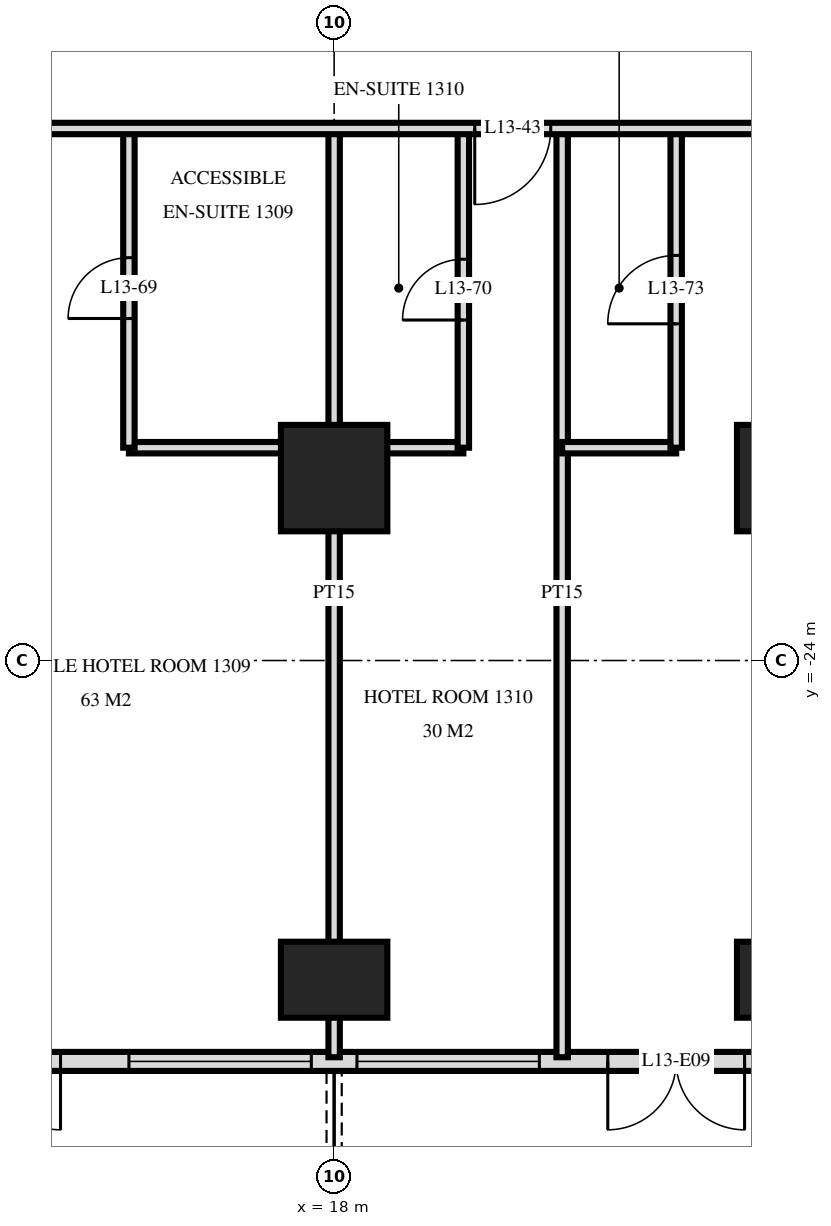
"""IFC4 building model, lengths in metres.
Left out: names, types, materials, properties, quantities, classifications, styles, units other than length and angle.
Written with IfcOpenShell. Run it as: python <this file> out.ifc"""

import sys

from ifc_helpers import new_model, si_unit, direction, frame, frame_2d, origin, origin_2d, place, context, subcontext, project, spatial, rectangle, extrude, element, fill, save


model = new_model("IFC4")
c1 = context("Model", 3, precision=1e-05, world=origin(), true_north=direction((0.0, 1.0)))
c2 = subcontext(c1, "Body", "Model", "MODEL_VIEW")
j1 = project(units=[si_unit("LENGTHUNIT", "METRE"), si_unit("PLANEANGLEUNIT", "RADIAN")], contexts=[c1])
p1 = place(None, origin())
s1 = spatial("IfcSite", under=j1, at=p1, CompositionType="ELEMENT")
p2 = place(p1, origin())
s2 = spatial("IfcBuilding", under=s1, at=p2, CompositionType="ELEMENT")
p3 = place(p2, frame((0.0, 0.0, 56.4)))
s3 = spatial("IfcBuildingStorey", under=s2, at=p3, CompositionType="ELEMENT", Elevation=56.4)
p4 = place(p3, frame((18.0, -28.2, 0.0), z_axis=(0.0, 0.0, 1.0), x_axis=(1.0, 0.0, 0.0)))
e1 = element("IfcColumn", 1, at=p4, inside=s3, PredefinedType="COLUMN", context=c2, shape_type="SweptSolid", body=[
    extrude(rectangle(XDim=1.4, YDim=1.0, at=origin_2d()), origin(), (0.0, 0.0, 1.0), 3.6),
])
p5 = place(p3, frame((18.0, -21.6, 0.0), z_axis=(0.0, 0.0, 1.0), x_axis=(1.0, 0.0, 0.0)))
e2 = element("IfcColumn", 2, at=p5, inside=s3, PredefinedType="COLUMN", context=c2, shape_type="SweptSolid", body=[
    extrude(rectangle(XDim=1.4, YDim=1.4, at=origin_2d()), origin(), (0.0, 0.0, 1.0), 3.6),
])
p6 = place(p3, frame((24.0, -28.2, 0.0), z_axis=(0.0, 0.0, 1.0), x_axis=(1.0, 0.0, 0.0)))
e3 = element("IfcColumn", 3, at=p6, inside=s3, PredefinedType="COLUMN", context=c2, shape_type="SweptSolid", body=[
    extrude(rectangle(XDim=1.4, YDim=1.0, at=origin_2d()), origin(), (0.0, 0.0, 1.0), 3.6),
])
p7 = place(p3, frame((24.0, -21.6, 0.0), z_axis=(0.0, 0.0, 1.0), x_axis=(1.0, 0.0, 0.0)))
e4 = element("IfcColumn", 4, at=p7, inside=s3, PredefinedType="COLUMN", context=c2, shape_type="SweptSolid", body=[
    extrude(rectangle(XDim=1.4, YDim=1.4, at=origin_2d()), origin(), (0.0, 0.0, 1.0), 3.6),
])
p8 = place(p3, frame((-28.775, -29.275, 0.0), z_axis=(0.0, 0.0, 1.0), x_axis=(1.0, 0.0, 0.0)))
e5 = element("IfcWall", 5, at=p8, inside=s3, PredefinedType="SOLIDWALL", context=c2, shape_type="SweptSolid", body=[
    extrude(rectangle(XDim=57.551, YDim=0.25, at=frame_2d((28.775, 0.0))), origin(), (0.0, 0.0, 1.0), 3.32),
])
p9 = place(p8, frame((0.575, 0.0, 0.0)))
e6 = element("IfcOpeningElement", 6, at=p9, cuts=e5, PredefinedType="OPENING", context=c2, shape_type="SweptSolid", body=[
    extrude(rectangle(XDim=1.8, YDim=2.4, at=frame_2d((0.9, 1.2))), frame((0.0, 0.135, 0.0), z_axis=(0.0, -1.0, 0.0), x_axis=(1.0, 0.0, 0.0)), (0.0, 0.0, 1.0), 0.27),
])
p10 = place(p8, frame((5.375, 0.0, 0.0)))
e7 = element("IfcOpeningElement", 7, at=p10, cuts=e5, PredefinedType="OPENING", context=c2, shape_type="SweptSolid", body=[
    extrude(rectangle(XDim=1.8, YDim=2.4, at=frame_2d((0.9, 1.2))), frame((0.0, 0.135, 0.0), z_axis=(0.0, -1.0, 0.0), x_axis=(1.0, 0.0, 0.0)), (0.0, 0.0, 1.0), 0.27),
])
p11 = place(p8, frame((8.075, 0.0, 0.3)))
e8 = element("IfcOpeningElement", 8, at=p11, cuts=e5, PredefinedType="OPENING", context=c2, shape_type="SweptSolid", body=[
    extrude(rectangle(XDim=2.4, YDim=2.1, at=frame_2d((1.2, 1.05))), frame((0.0, 0.135, 0.0), z_axis=(0.0, -1.0, 0.0), x_axis=(1.0, 0.0, 0.0)), (0.0, 0.0, 1.0), 0.27),
])
p12 = place(p8, frame((11.375, 0.0, 0.0)))
e9 = element("IfcOpeningElement", 9, at=p12, cuts=e5, PredefinedType="OPENING", context=c2, shape_type="SweptSolid", body=[
    extrude(rectangle(XDim=1.8, YDim=2.4, at=frame_2d((0.9, 1.2))), frame((0.0, 0.135, 0.0), z_axis=(0.0, -1.0, 0.0), x_axis=(1.0, 0.0, 0.0)), (0.0, 0.0, 1.0), 0.27),
])
p13 = place(p8, frame((14.075, 0.0, 0.3)))
e10 = element("IfcOpeningElement", 10, at=p13, cuts=e5, PredefinedType="OPENING", context=c2, shape_type="SweptSolid", body=[
    extrude(rectangle(XDim=2.4, YDim=2.1, at=frame_2d((1.2, 1.05))), frame((0.0, 0.135, 0.0), z_axis=(0.0, -1.0, 0.0), x_axis=(1.0, 0.0, 0.0)), (0.0, 0.0, 1.0), 0.27),
])
p14 = place(p8, frame((17.375, 0.0, 0.0)))
e11 = element("IfcOpeningElement", 11, at=p14, cuts=e5, PredefinedType="OPENING", context=c2, shape_type="SweptSolid", body=[
    extrude(rectangle(XDim=1.8, YDim=2.4, at=frame_2d((0.9, 1.2))), frame((0.0, 0.135, 0.0), z_axis=(0.0, -1.0, 0.0), x_axis=(1.0, 0.0, 0.0)), (0.0, 0.0, 1.0), 0.27),
])
p15 = place(p8, frame((20.075, 0.0, 0.3)))
e12 = element("IfcOpeningElement", 12, at=p15, cuts=e5, PredefinedType="OPENING", context=c2, shape_type="SweptSolid", body=[
    extrude(rectangle(XDim=2.4, YDim=2.1, at=frame_2d((1.2, 1.05))), frame((0.0, 0.135, 0.0), z_axis=(0.0, -1.0, 0.0), x_axis=(1.0, 0.0, 0.0)), (0.0, 0.0, 1.0), 0.27),
])
p16 = place(p8, frame((23.075, 0.0, 0.3)))
e13 = element("IfcOpeningElement", 13, at=p16, cuts=e5, PredefinedType="OPENING", context=c2, shape_type="SweptSolid", body=[
    extrude(rectangle(XDim=2.4, YDim=2.1, at=frame_2d((1.2, 1.05))), frame((0.0, 0.135, 0.0), z_axis=(0.0, -1.0, 0.0), x_axis=(1.0, 0.0, 0.0)), (0.0, 0.0, 1.0), 0.27),
])
p17 = place(p8, frame((26.375, 0.0, 0.0)))
e14 = element("IfcOpeningElement", 14, at=p17, cuts=e5, PredefinedType="OPENING", context=c2, shape_type="SweptSolid", body=[
    extrude(rectangle(XDim=1.8, YDim=2.4, at=frame_2d((0.9, 1.2))), frame((0.0, 0.135, 0.0), z_axis=(0.0, -1.0, 0.0), x_axis=(1.0, 0.0, 0.0)), (0.0, 0.0, 1.0), 0.27),
])
p18 = place(p8, frame((29.075, 0.0, 0.3)))
e15 = element("IfcOpeningElement", 15, at=p18, cuts=e5, PredefinedType="OPENING", context=c2, shape_type="SweptSolid", body=[
    extrude(rectangle(XDim=2.4, YDim=2.1, at=frame_2d((1.2, 1.05))), frame((0.0, 0.135, 0.0), z_axis=(0.0, -1.0, 0.0), x_axis=(1.0, 0.0, 0.0)), (0.0, 0.0, 1.0), 0.27),
])
p19 = place(p8, frame((32.375, 0.0, 0.0)))
e16 = element("IfcOpeningElement", 16, at=p19, cuts=e5, PredefinedType="OPENING", context=c2, shape_type="SweptSolid", body=[
    extrude(rectangle(XDim=1.8, YDim=2.4, at=frame_2d((0.9, 1.2))), frame((0.0, 0.135, 0.0), z_axis=(0.0, -1.0, 0.0), x_axis=(1.0, 0.0, 0.0)), (0.0, 0.0, 1.0), 0.27),
])
p20 = place(p8, frame((35.375, 0.0, 0.0)))
e17 = element("IfcOpeningElement", 17, at=p20, cuts=e5, PredefinedType="OPENING", context=c2, shape_type="SweptSolid", body=[
    extrude(rectangle(XDim=1.8, YDim=2.4, at=frame_2d((0.9, 1.2))), frame((0.0, 0.135, 0.0), z_axis=(0.0, -1.0, 0.0), x_axis=(1.0, 0.0, 0.0)), (0.0, 0.0, 1.0), 0.27),
])
p21 = place(p8, frame((38.075, 0.0, 0.3)))
e18 = element("IfcOpeningElement", 18, at=p21, cuts=e5, PredefinedType="OPENING", context=c2, shape_type="SweptSolid", body=[
    extrude(rectangle(XDim=2.4, YDim=2.1, at=frame_2d((1.2, 1.05))), frame((0.0, 0.135, 0.0), z_axis=(0.0, -1.0, 0.0), x_axis=(1.0, 0.0, 0.0)), (0.0, 0.0, 1.0), 0.27),
])
p22 = place(p8, frame((41.375, 0.0, 0.0)))
e19 = element("IfcOpeningElement", 19, at=p22, cuts=e5, PredefinedType="OPENING", context=c2, shape_type="SweptSolid", body=[
    extrude(rectangle(XDim=1.8, YDim=2.4, at=frame_2d((0.9, 1.2))), frame((0.0, 0.135, 0.0), z_axis=(0.0, -1.0, 0.0), x_axis=(1.0, 0.0, 0.0)), (0.0, 0.0, 1.0), 0.27),
])
p23 = place(p8, frame((44.075, 0.0, 0.3)))
e20 = element("IfcOpeningElement", 20, at=p23, cuts=e5, PredefinedType="OPENING", context=c2, shape_type="SweptSolid", body=[
    extrude(rectangle(XDim=2.4, YDim=2.1, at=frame_2d((1.2, 1.05))), frame((0.0, 0.135, 0.0), z_axis=(0.0, -1.0, 0.0), x_axis=(1.0, 0.0, 0.0)), (0.0, 0.0, 1.0), 0.27),
])
p24 = place(p8, frame((47.075, 0.0, 0.3)))
e21 = element("IfcOpeningElement", 21, at=p24, cuts=e5, PredefinedType="OPENING", context=c2, shape_type="SweptSolid", body=[
    extrude(rectangle(XDim=2.4, YDim=2.1, at=frame_2d((1.2, 1.05))), frame((0.0, 0.135, 0.0), z_axis=(0.0, -1.0, 0.0), x_axis=(1.0, 0.0, 0.0)), (0.0, 0.0, 1.0), 0.27),
])
p25 = place(p8, frame((50.375, 0.0, 0.0)))
e22 = element("IfcOpeningElement", 22, at=p25, cuts=e5, PredefinedType="OPENING", context=c2, shape_type="SweptSolid", body=[
    extrude(rectangle(XDim=1.8, YDim=2.4, at=frame_2d((0.9, 1.2))), frame((0.0, 0.135, 0.0), z_axis=(0.0, -1.0, 0.0), x_axis=(1.0, 0.0, 0.0)), (0.0, 0.0, 1.0), 0.27),
])
p26 = place(p8, frame((53.375, 0.0, 0.0)))
e23 = element("IfcOpeningElement", 23, at=p26, cuts=e5, PredefinedType="OPENING", context=c2, shape_type="SweptSolid", body=[
    extrude(rectangle(XDim=1.8, YDim=2.4, at=frame_2d((0.9, 1.2))), frame((0.0, 0.135, 0.0), z_axis=(0.0, -1.0, 0.0), x_axis=(1.0, 0.0, 0.0)), (0.0, 0.0, 1.0), 0.27),
])
p27 = place(p3, frame((22.5, -21.2, 0.0), z_axis=(0.0, 0.0, 1.0), x_axis=(0.0, 1.0, 0.0)))
e24 = element("IfcWall", 24, at=p27, inside=s3, PredefinedType="PARTITIONING", context=c2, shape_type="SweptSolid", body=[
    extrude(rectangle(XDim=4.2, YDim=0.15, at=frame_2d((2.1, 0.0))), origin(), (0.0, 0.0, 1.0), 3.32),
])
p28 = place(p27, frame((1.63, 0.0, 0.0)))
e25 = element("IfcOpeningElement", 25, at=p28, cuts=e24, PredefinedType="OPENING", context=c2, shape_type="SweptSolid", body=[
    extrude(rectangle(XDim=0.9, YDim=2.1, at=frame_2d((0.45, 1.05))), frame((0.0, 0.085, 0.0), z_axis=(0.0, -1.0, 0.0), x_axis=(1.0, 0.0, 0.0)), (0.0, 0.0, 1.0), 0.17),
])
p29 = place(p3, frame((21.0, -29.22, 0.0), z_axis=(0.0, 0.0, 1.0), x_axis=(0.0, 1.0, 0.0)))
e26 = element("IfcWall", 26, at=p29, inside=s3, PredefinedType="PARTITIONING", context=c2, shape_type="SweptSolid", body=[
    extrude(rectangle(XDim=12.22, YDim=0.15, at=frame_2d((6.11, 0.0))), origin(), (0.0, 0.0, 1.0), 3.32),
])
p30 = place(p3, frame((19.7, -21.2, 0.0), z_axis=(0.0, 0.0, 1.0), x_axis=(0.0, 1.0, 0.0)))
e27 = element("IfcWall", 27, at=p30, inside=s3, PredefinedType="PARTITIONING", context=c2, shape_type="SweptSolid", body=[
    extrude(rectangle(XDim=4.2, YDim=0.15, at=frame_2d((2.1, 0.0))), origin(), (0.0, 0.0, 1.0), 3.32),
])
p31 = place(p30, frame((1.68, 0.0, 0.0)))
e28 = element("IfcOpeningElement", 28, at=p31, cuts=e27, PredefinedType="OPENING", context=c2, shape_type="SweptSolid", body=[
    extrude(rectangle(XDim=0.8, YDim=2.1, at=frame_2d((0.4, 1.05))), frame((0.0, 0.085, 0.0), z_axis=(0.0, -1.0, 0.0), x_axis=(1.0, 0.0, 0.0)), (0.0, 0.0, 1.0), 0.17),
])
p32 = place(p3, frame((18.0, -29.22, 0.0), z_axis=(0.0, 0.0, 1.0), x_axis=(0.0, 1.0, 0.0)))
e29 = element("IfcWall", 29, at=p32, inside=s3, PredefinedType="PARTITIONING", context=c2, shape_type="SweptSolid", body=[
    extrude(rectangle(XDim=12.22, YDim=0.15, at=frame_2d((6.11, 0.0))), origin(), (0.0, 0.0, 1.0), 3.32),
])
p33 = place(p3, frame((15.3, -21.2, 0.0), z_axis=(0.0, 0.0, 1.0), x_axis=(0.0, 1.0, 0.0)))
e30 = element("IfcWall", 30, at=p33, inside=s3, PredefinedType="PARTITIONING", context=c2, shape_type="SweptSolid", body=[
    extrude(rectangle(XDim=4.2, YDim=0.15, at=frame_2d((2.1, 0.0))), origin(), (0.0, 0.0, 1.0), 3.32),
])
p34 = place(p33, frame((1.7, 0.0, 0.0)))
e31 = element("IfcOpeningElement", 31, at=p34, cuts=e30, PredefinedType="OPENING", context=c2, shape_type="SweptSolid", body=[
    extrude(rectangle(XDim=0.8, YDim=2.1, at=frame_2d((0.4, 1.05))), frame((0.0, 0.085, 0.0), z_axis=(0.0, -1.0, 0.0), x_axis=(1.0, 0.0, 0.0)), (0.0, 0.0, 1.0), 0.17),
])
p35 = place(p3, frame((15.3, -21.2, 0.0), z_axis=(0.0, 0.0, 1.0), x_axis=(1.0, 0.0, 0.0)))
e32 = element("IfcWall", 32, at=p35, inside=s3, PredefinedType="PARTITIONING", context=c2, shape_type="SweptSolid", body=[
    extrude(rectangle(XDim=4.4, YDim=0.15, at=frame_2d((2.2, 0.0))), origin(), (0.0, 0.0, 1.0), 3.32),
])
p36 = place(p3, frame((21.0, -21.2, 0.0), z_axis=(0.0, 0.0, 1.0), x_axis=(1.0, 0.0, 0.0)))
e33 = element("IfcWall", 33, at=p36, inside=s3, PredefinedType="PARTITIONING", context=c2, shape_type="SweptSolid", body=[
    extrude(rectangle(XDim=1.5, YDim=0.15, at=frame_2d((0.75, 0.0))), origin(), (0.0, 0.0, 1.0), 3.32),
])
p37 = place(p3, frame((-33.12, -17.0, 0.0), z_axis=(0.0, 0.0, 1.0), x_axis=(1.0, 0.0, 0.0)))
e34 = element("IfcWall", 34, at=p37, inside=s3, PredefinedType="PARTITIONING", context=c2, shape_type="SweptSolid", body=[
    extrude(rectangle(XDim=66.24, YDim=0.15, at=frame_2d((33.12, 0.0))), origin(), (0.0, 0.0, 1.0), 3.32),
])
p38 = place(p37, frame((12.27, 0.0, 0.0)))
e35 = element("IfcOpeningElement", 35, at=p38, cuts=e34, PredefinedType="OPENING", context=c2, shape_type="SweptSolid", body=[
    extrude(rectangle(XDim=1.0, YDim=2.1, at=frame_2d((0.5, 1.05))), frame((0.0, 0.085, 0.0), z_axis=(0.0, -1.0, 0.0), x_axis=(1.0, 0.0, 0.0)), (0.0, 0.0, 1.0), 0.17),
])
p39 = place(p37, frame((16.97, 0.0, 0.0)))
e36 = element("IfcOpeningElement", 36, at=p39, cuts=e34, PredefinedType="OPENING", context=c2, shape_type="SweptSolid", body=[
    extrude(rectangle(XDim=1.0, YDim=2.1, at=frame_2d((0.5, 1.05))), frame((0.0, 0.085, 0.0), z_axis=(0.0, -1.0, 0.0), x_axis=(1.0, 0.0, 0.0)), (0.0, 0.0, 1.0), 0.17),
])
p40 = place(p37, frame((18.27, 0.0, 0.0)))
e37 = element("IfcOpeningElement", 37, at=p40, cuts=e34, PredefinedType="OPENING", context=c2, shape_type="SweptSolid", body=[
    extrude(rectangle(XDim=1.0, YDim=2.1, at=frame_2d((0.5, 1.05))), frame((0.0, 0.085, 0.0), z_axis=(0.0, -1.0, 0.0), x_axis=(1.0, 0.0, 0.0)), (0.0, 0.0, 1.0), 0.17),
])
p41 = place(p37, frame((22.97, 0.0, 0.0)))
e38 = element("IfcOpeningElement", 38, at=p41, cuts=e34, PredefinedType="OPENING", context=c2, shape_type="SweptSolid", body=[
    extrude(rectangle(XDim=1.0, YDim=2.1, at=frame_2d((0.5, 1.05))), frame((0.0, 0.085, 0.0), z_axis=(0.0, -1.0, 0.0), x_axis=(1.0, 0.0, 0.0)), (0.0, 0.0, 1.0), 0.17),
])
p42 = place(p37, frame((24.27, 0.0, 0.0)))
e39 = element("IfcOpeningElement", 39, at=p42, cuts=e34, PredefinedType="OPENING", context=c2, shape_type="SweptSolid", body=[
    extrude(rectangle(XDim=1.0, YDim=2.1, at=frame_2d((0.5, 1.05))), frame((0.0, 0.085, 0.0), z_axis=(0.0, -1.0, 0.0), x_axis=(1.0, 0.0, 0.0)), (0.0, 0.0, 1.0), 0.17),
])
p43 = place(p37, frame((28.97, 0.0, 0.0)))
e40 = element("IfcOpeningElement", 40, at=p43, cuts=e34, PredefinedType="OPENING", context=c2, shape_type="SweptSolid", body=[
    extrude(rectangle(XDim=1.0, YDim=2.1, at=frame_2d((0.5, 1.05))), frame((0.0, 0.085, 0.0), z_axis=(0.0, -1.0, 0.0), x_axis=(1.0, 0.0, 0.0)), (0.0, 0.0, 1.0), 0.17),
])
p44 = place(p37, frame((30.27, 0.0, 0.0)))
e41 = element("IfcOpeningElement", 41, at=p44, cuts=e34, PredefinedType="OPENING", context=c2, shape_type="SweptSolid", body=[
    extrude(rectangle(XDim=1.0, YDim=2.1, at=frame_2d((0.5, 1.05))), frame((0.0, 0.085, 0.0), z_axis=(0.0, -1.0, 0.0), x_axis=(1.0, 0.0, 0.0)), (0.0, 0.0, 1.0), 0.17),
])
p45 = place(p37, frame((33.82, 0.0, 0.0)))
e42 = element("IfcOpeningElement", 42, at=p45, cuts=e34, PredefinedType="OPENING", context=c2, shape_type="SweptSolid", body=[
    extrude(rectangle(XDim=1.0, YDim=2.1, at=frame_2d((0.5, 1.05))), frame((0.0, 0.085, 0.0), z_axis=(0.0, -1.0, 0.0), x_axis=(1.0, 0.0, 0.0)), (0.0, 0.0, 1.0), 0.17),
])
p46 = place(p37, frame((46.27, 0.0, 0.0)))
e43 = element("IfcOpeningElement", 43, at=p46, cuts=e34, PredefinedType="OPENING", context=c2, shape_type="SweptSolid", body=[
    extrude(rectangle(XDim=1.0, YDim=2.1, at=frame_2d((0.5, 1.05))), frame((0.0, 0.085, 0.0), z_axis=(0.0, -1.0, 0.0), x_axis=(1.0, 0.0, 0.0)), (0.0, 0.0, 1.0), 0.17),
])
p47 = place(p37, frame((52.97, 0.0, 0.0)))
e44 = element("IfcOpeningElement", 44, at=p47, cuts=e34, PredefinedType="OPENING", context=c2, shape_type="SweptSolid", body=[
    extrude(rectangle(XDim=1.0, YDim=2.1, at=frame_2d((0.5, 1.05))), frame((0.0, 0.085, 0.0), z_axis=(0.0, -1.0, 0.0), x_axis=(1.0, 0.0, 0.0)), (0.0, 0.0, 1.0), 0.17),
])
p48 = place(p37, frame((6.05, 0.0, 0.0)))
e45 = element("IfcOpeningElement", 45, at=p48, cuts=e34, PredefinedType="OPENING", context=c2, shape_type="SweptSolid", body=[
    extrude(rectangle(XDim=1.0, YDim=2.1, at=frame_2d((0.5, 1.05))), frame((0.0, 0.085, 0.0), z_axis=(0.0, -1.0, 0.0), x_axis=(1.0, 0.0, 0.0)), (0.0, 0.0, 1.0), 0.17),
])
p49 = place(p37, frame((59.15, 0.0, 0.0)))
e46 = element("IfcOpeningElement", 46, at=p49, cuts=e34, PredefinedType="OPENING", context=c2, shape_type="SweptSolid", body=[
    extrude(rectangle(XDim=1.0, YDim=2.1, at=frame_2d((0.5, 1.05))), frame((0.0, 0.085, 0.0), z_axis=(0.0, -1.0, 0.0), x_axis=(1.0, 0.0, 0.0)), (0.0, 0.0, 1.0), 0.17),
])
p50 = place(p22, frame((0.9, 0.0, 0.0), z_axis=(0.0, 0.0, 1.0), x_axis=(-1.0, 0.0, 0.0)))
e47 = element("IfcDoor", 47, at=p50, inside=s3, OperationType="DOUBLE_DOOR_SINGLE_SWING", PredefinedType="DOOR", context=c2, shape_type="SweptSolid", body=[
    extrude(rectangle(XDim=1.8, YDim=2.4, at=frame_2d((0.0, 1.2))), frame((0.0, -0.025, 0.0), z_axis=(0.0, 1.0, 0.0), x_axis=(-1.0, 0.0, 0.0)), (0.0, 0.0, 1.0), 0.05),
])
fill(e19, e47)
p51 = place(p23, origin())
e48 = element("IfcWindow", 48, at=p51, inside=s3, PartitioningType="SINGLE_PANEL", PredefinedType="WINDOW", context=c2, shape_type="SweptSolid", body=[
    extrude(rectangle(XDim=2.4, YDim=2.1, at=frame_2d((1.2, 1.05))), frame((0.0, 0.03, 0.0), z_axis=(0.0, -1.0, 0.0), x_axis=(1.0, 0.0, 0.0)), (0.0, 0.0, 1.0), 0.06),
])
fill(e20, e48)
p52 = place(p24, origin())
e49 = element("IfcWindow", 49, at=p52, inside=s3, PartitioningType="SINGLE_PANEL", PredefinedType="WINDOW", context=c2, shape_type="SweptSolid", body=[
    extrude(rectangle(XDim=2.4, YDim=2.1, at=frame_2d((1.2, 1.05))), frame((0.0, 0.03, 0.0), z_axis=(0.0, -1.0, 0.0), x_axis=(1.0, 0.0, 0.0)), (0.0, 0.0, 1.0), 0.06),
])
fill(e21, e49)
p53 = place(p25, frame((0.9, 0.0, 0.0), z_axis=(0.0, 0.0, 1.0), x_axis=(-1.0, 0.0, 0.0)))
e50 = element("IfcDoor", 50, at=p53, inside=s3, OperationType="DOUBLE_DOOR_SINGLE_SWING", PredefinedType="DOOR", context=c2, shape_type="SweptSolid", body=[
    extrude(rectangle(XDim=1.8, YDim=2.4, at=frame_2d((0.0, 1.2))), frame((0.0, -0.025, 0.0), z_axis=(0.0, 1.0, 0.0), x_axis=(-1.0, 0.0, 0.0)), (0.0, 0.0, 1.0), 0.05),
])
fill(e22, e50)
p54 = place(p47, frame((0.5, 0.0, 0.0), z_axis=(0.0, 0.0, 1.0), x_axis=(-1.0, 0.0, 0.0)))
e51 = element("IfcDoor", 51, at=p54, inside=s3, OperationType="SINGLE_SWING_LEFT", PredefinedType="DOOR", context=c2, shape_type="SweptSolid", body=[
    extrude(rectangle(XDim=1.0, YDim=2.1, at=frame_2d((0.0, 1.05))), frame((0.0, -0.025, 0.0), z_axis=(0.0, 1.0, 0.0), x_axis=(-1.0, 0.0, 0.0)), (0.0, 0.0, 1.0), 0.05),
])
fill(e44, e51)
p55 = place(p34, origin())
e52 = element("IfcDoor", 52, at=p55, inside=s3, OperationType="SINGLE_SWING_RIGHT", PredefinedType="DOOR", context=c2, shape_type="SweptSolid", body=[
    extrude(rectangle(XDim=0.8, YDim=2.1, at=frame_2d((0.4, 1.05))), frame((0.0, 0.025, 0.0), z_axis=(0.0, -1.0, 0.0), x_axis=(1.0, 0.0, 0.0)), (0.0, 0.0, 1.0), 0.05),
])
fill(e31, e52)
p56 = place(p31, origin())
e53 = element("IfcDoor", 53, at=p56, inside=s3, OperationType="SINGLE_SWING_RIGHT", PredefinedType="DOOR", context=c2, shape_type="SweptSolid", body=[
    extrude(rectangle(XDim=0.8, YDim=2.1, at=frame_2d((0.4, 1.05))), frame((0.0, 0.025, 0.0), z_axis=(0.0, -1.0, 0.0), x_axis=(1.0, 0.0, 0.0)), (0.0, 0.0, 1.0), 0.05),
])
fill(e28, e53)
p57 = place(p28, origin())
e54 = element("IfcDoor", 54, at=p57, inside=s3, OperationType="SINGLE_SWING_RIGHT", PredefinedType="DOOR", context=c2, shape_type="SweptSolid", body=[
    extrude(rectangle(XDim=0.9, YDim=2.1, at=frame_2d((0.45, 1.05))), frame((0.0, 0.025, 0.0), z_axis=(0.0, -1.0, 0.0), x_axis=(1.0, 0.0, 0.0)), (0.0, 0.0, 1.0), 0.05),
])
fill(e25, e54)
save(model, sys.argv[1])
